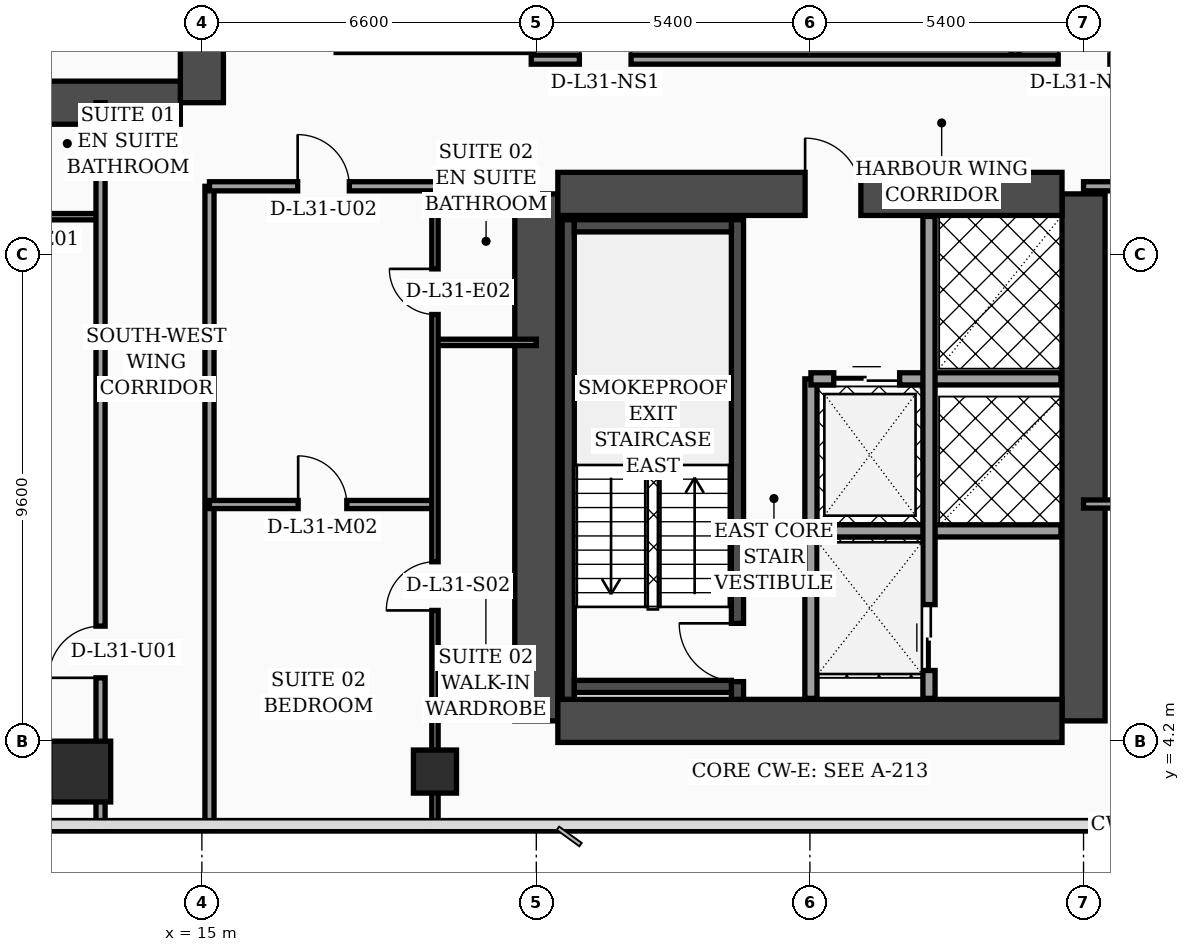
"""IFC4 building model, lengths in metres.
Left out: names, types, materials, properties, quantities, classifications, styles, units other than length and angle.
Written with IfcOpenShell. Run it as: python <this file> out.ifc"""

import sys

from ifc_helpers import new_model, si_unit, direction, frame, frame_2d, origin, origin_2d, place, context, subcontext, project, spatial, rectangle, hollow_rectangle, extrude, element, fill, save


model = new_model("IFC4")
c1 = context("Model", 3, precision=1e-05, world=origin(), true_north=direction((0.0, 1.0)))
c2 = subcontext(c1, "Body", "Model", "MODEL_VIEW")
j1 = project(units=[si_unit("LENGTHUNIT", "METRE"), si_unit("PLANEANGLEUNIT", "RADIAN")], contexts=[c1])
p1 = place(None, origin())
s1 = spatial("IfcSite", under=j1, at=p1, CompositionType="ELEMENT")
p2 = place(p1, origin())
s2 = spatial("IfcBuilding", under=s1, at=p2, CompositionType="ELEMENT")
p3 = place(p2, frame((0.0, 0.0, 127.8)))
s3 = spatial("IfcBuildingStorey", under=s2, at=p3, CompositionType="ELEMENT", Elevation=127.8)
p4 = place(p3, frame((15.0, 16.8, 0.0), z_axis=(0.0, 0.0, 1.0), x_axis=(0.0, 1.0, 0.0)))
e1 = element("IfcWall", 1, at=p4, inside=s3, PredefinedType="SHEAR", context=c2, shape_type="SweptSolid", body=[
    extrude(rectangle(XDim=21.6, YDim=0.85, at=frame_2d((10.8, 0.0))), origin(), (0.0, 0.0, 1.0), 3.56),
])
p5 = place(p4, frame((8.65, 0.0, 0.0)))
e2 = element("IfcOpeningElement", 2, at=p5, cuts=e1, PredefinedType="OPENING", context=c2, shape_type="SweptSolid", body=[
    extrude(rectangle(XDim=1.1, YDim=2.2, at=frame_2d((0.55, 1.1))), frame((0.0, 0.435, 0.0), z_axis=(0.0, -1.0, 0.0), x_axis=(1.0, 0.0, 0.0)), (0.0, 0.0, 1.0), 0.87),
])
p6 = place(p4, frame((10.85, 0.0, 0.0)))
e3 = element("IfcOpeningElement", 3, at=p6, cuts=e1, PredefinedType="OPENING", context=c2, shape_type="SweptSolid", body=[
    extrude(rectangle(XDim=1.1, YDim=2.2, at=frame_2d((0.55, 1.1))), frame((0.0, 0.435, 0.0), z_axis=(0.0, -1.0, 0.0), x_axis=(1.0, 0.0, 0.0)), (0.0, 0.0, 1.0), 0.87),
])
p7 = place(p4, frame((13.5, 0.0, 0.0)))
e4 = element("IfcOpeningElement", 4, at=p7, cuts=e1, PredefinedType="OPENING", context=c2, shape_type="SweptSolid", body=[
    extrude(rectangle(XDim=1.1, YDim=2.2, at=frame_2d((0.55, 1.1))), frame((0.0, 0.435, 0.0), z_axis=(0.0, -1.0, 0.0), x_axis=(1.0, 0.0, 0.0)), (0.0, 0.0, 1.0), 0.87),
])
p8 = place(p4, frame((16.15, 0.0, 0.0)))
e5 = element("IfcOpeningElement", 5, at=p8, cuts=e1, PredefinedType="OPENING", context=c2, shape_type="SweptSolid", body=[
    extrude(rectangle(XDim=1.1, YDim=2.2, at=frame_2d((0.55, 1.1))), frame((0.0, 0.435, 0.0), z_axis=(0.0, -1.0, 0.0), x_axis=(1.0, 0.0, 0.0)), (0.0, 0.0, 1.0), 0.87),
])
p9 = place(p3, frame((4.625, 16.8, 0.0), z_axis=(0.0, 0.0, 1.0), x_axis=(1.0, 0.0, 0.0)))
e6 = element("IfcWall", 6, at=p9, inside=s3, PredefinedType="SHEAR", context=c2, shape_type="SweptSolid", body=[
    extrude(rectangle(XDim=9.95, YDim=0.85, at=frame_2d((4.975, 0.0))), origin(), (0.0, 0.0, 1.0), 3.56),
])
for number, where, z_axis, x_axis in (
    (7, (21.6, 4.6, 0.0), (0.0, 0.0, 1.0), (0.0, 1.0, 0.0)),
    (8, (32.4, 4.6, 0.0), (0.0, 0.0, 1.0), (0.0, 1.0, 0.0)),
):
    element("IfcWall", number, at=place(p3, frame(where, z_axis=z_axis, x_axis=x_axis)), inside=s3, PredefinedType="SHEAR", context=c2, shape_type="SweptSolid", body=[
        extrude(rectangle(XDim=10.4, YDim=0.85, at=frame_2d((5.2, 0.0))), origin(), (0.0, 0.0, 1.0), 3.56),
    ])
p10 = place(p3, frame((22.025, 15.0, 0.0), z_axis=(0.0, 0.0, 1.0), x_axis=(1.0, 0.0, 0.0)))
e9 = element("IfcWall", 9, at=p10, inside=s3, PredefinedType="SHEAR", context=c2, shape_type="SweptSolid", body=[
    extrude(rectangle(XDim=9.95, YDim=0.85, at=frame_2d((4.975, 0.0))), origin(), (0.0, 0.0, 1.0), 3.56),
])
p11 = place(p10, frame((4.88, 0.0, 0.0)))
e10 = element("IfcOpeningElement", 10, at=p11, cuts=e9, PredefinedType="OPENING", context=c2, shape_type="SweptSolid", body=[
    extrude(rectangle(XDim=1.1, YDim=2.2, at=frame_2d((0.55, 1.1))), frame((0.0, 0.435, 0.0), z_axis=(0.0, -1.0, 0.0), x_axis=(1.0, 0.0, 0.0)), (0.0, 0.0, 1.0), 0.87),
])
p12 = place(p3, frame((22.025, 4.6, 0.0), z_axis=(0.0, 0.0, 1.0), x_axis=(1.0, 0.0, 0.0)))
e11 = element("IfcWall", 11, at=p12, inside=s3, PredefinedType="SHEAR", context=c2, shape_type="SweptSolid", body=[
    extrude(rectangle(XDim=9.95, YDim=0.85, at=frame_2d((4.975, 0.0))), origin(), (0.0, 0.0, 1.0), 3.56),
])
p13 = place(p3, frame((22.23, 5.025, 0.0), z_axis=(0.0, 0.0, 1.0), x_axis=(0.0, 1.0, 0.0)))
e12 = element("IfcWall", 12, at=p13, inside=s3, PredefinedType="SOLIDWALL", context=c2, shape_type="SweptSolid", body=[
    extrude(rectangle(XDim=9.465, YDim=0.24, at=frame_2d((4.732, 0.0))), origin(), (0.0, 0.0, 1.0), 3.56),
])
p14 = place(p3, frame((25.57, 5.025, 0.0), z_axis=(0.0, 0.0, 1.0), x_axis=(0.0, 1.0, 0.0)))
e13 = element("IfcWall", 13, at=p14, inside=s3, PredefinedType="SOLIDWALL", context=c2, shape_type="SweptSolid", body=[
    extrude(rectangle(XDim=9.465, YDim=0.24, at=frame_2d((4.732, 0.0))), origin(), (0.0, 0.0, 1.0), 3.56),
])
p15 = place(p14, frame((0.35, 0.0, 0.0)))
e14 = element("IfcOpeningElement", 14, at=p15, cuts=e13, PredefinedType="OPENING", context=c2, shape_type="SweptSolid", body=[
    extrude(rectangle(XDim=1.15, YDim=2.2, at=frame_2d((0.575, 1.1))), frame((0.0, 0.13, 0.0), z_axis=(0.0, -1.0, 0.0), x_axis=(1.0, 0.0, 0.0)), (0.0, 0.0, 1.0), 0.26),
])
for number, where, z_axis, x_axis in (
    (15, (22.35, 5.28, 0.0), (0.0, 0.0, 1.0), (1.0, 0.0, 0.0)),
    (16, (22.35, 14.37, 0.0), (0.0, 0.0, 1.0), (1.0, 0.0, 0.0)),
):
    element("IfcWall", number, at=place(p3, frame(where, z_axis=z_axis, x_axis=x_axis)), inside=s3, PredefinedType="SOLIDWALL", context=c2, shape_type="SweptSolid", body=[
        extrude(rectangle(XDim=3.1, YDim=0.24, at=frame_2d((1.55, 0.0))), origin(), (0.0, 0.0, 1.0), 3.56),
    ])
p16 = place(p3, frame((12.6, 3.6, 0.0), z_axis=(0.0, 0.0, 1.0), x_axis=(1.0, 0.0, 0.0)))
e17 = element("IfcColumn", 17, at=p16, inside=s3, PredefinedType="COLUMN", context=c2, shape_type="SweptSolid", body=[
    extrude(rectangle(XDim=1.2, YDim=1.2, at=origin_2d()), origin(), (0.0, 0.0, 1.0), 3.56),
])
p17 = place(p3, frame((19.6, 3.6, 0.0), z_axis=(0.0, 0.0, 1.0), x_axis=(1.0, 0.0, 0.0)))
e18 = element("IfcColumn", 18, at=p17, inside=s3, PredefinedType="COLUMN", context=c2, shape_type="SweptSolid", body=[
    extrude(hollow_rectangle(XDim=0.85, YDim=0.85, WallThickness=0.036, at=origin_2d()), origin(), (0.0, 0.0, 1.0), 3.56),
])
p18 = place(p3, frame((27.02, 5.045, 0.0), z_axis=(0.0, 0.0, 1.0), x_axis=(0.0, 1.0, 0.0)))
e19 = element("IfcWall", 19, at=p18, inside=s3, PredefinedType="SOLIDWALL", context=c2, shape_type="SweptSolid", body=[
    extrude(rectangle(XDim=6.305, YDim=0.24, at=frame_2d((3.153, 0.0))), origin(), (0.0, 0.0, 1.0), 3.56),
])
p19 = place(p3, frame((27.02, 11.35, 0.0), z_axis=(0.0, 0.0, 1.0), x_axis=(1.0, 0.0, 0.0)))
e20 = element("IfcWall", 20, at=p19, inside=s3, PredefinedType="SOLIDWALL", context=c2, shape_type="SweptSolid", body=[
    extrude(rectangle(XDim=4.935, YDim=0.24, at=frame_2d((2.468, 0.0))), origin(), (0.0, 0.0, 1.0), 3.56),
])
p20 = place(p19, frame((0.45, 0.0, 0.0)))
e21 = element("IfcOpeningElement", 21, at=p20, cuts=e20, PredefinedType="OPENING", context=c2, shape_type="SweptSolid", body=[
    extrude(rectangle(XDim=1.3, YDim=2.35, at=frame_2d((0.65, 1.175))), frame((0.0, 0.13, 0.0), z_axis=(0.0, -1.0, 0.0), x_axis=(1.0, 0.0, 0.0)), (0.0, 0.0, 1.0), 0.26),
])
p21 = place(p3, frame((27.02, 8.35, 0.0), z_axis=(0.0, 0.0, 1.0), x_axis=(1.0, 0.0, 0.0)))
e22 = element("IfcWall", 22, at=p21, inside=s3, PredefinedType="SOLIDWALL", context=c2, shape_type="SweptSolid", body=[
    extrude(rectangle(XDim=4.935, YDim=0.24, at=frame_2d((2.468, 0.0))), origin(), (0.0, 0.0, 1.0), 3.56),
])
p22 = place(p3, frame((29.35, 5.045, 0.0), z_axis=(0.0, 0.0, 1.0), x_axis=(0.0, 1.0, 0.0)))
e23 = element("IfcWall", 23, at=p22, inside=s3, PredefinedType="SOLIDWALL", context=c2, shape_type="SweptSolid", body=[
    extrude(rectangle(XDim=9.51, YDim=0.24, at=frame_2d((4.755, 0.0))), origin(), (0.0, 0.0, 1.0), 3.56),
])
p23 = place(p22, frame((0.55, 0.0, 0.0)))
e24 = element("IfcOpeningElement", 24, at=p23, cuts=e23, PredefinedType="OPENING", context=c2, shape_type="SweptSolid", body=[
    extrude(rectangle(XDim=1.3, YDim=2.35, at=frame_2d((0.65, 1.175))), frame((0.0, 0.13, 0.0), z_axis=(0.0, -1.0, 0.0), x_axis=(1.0, 0.0, 0.0)), (0.0, 0.0, 1.0), 0.26),
])
p24 = place(p3, frame((3.2, 14.55, 0.0), z_axis=(0.0, 0.0, 1.0), x_axis=(1.0, 0.0, 0.0)))
e25 = element("IfcWall", 25, at=p24, inside=s3, PredefinedType="PARTITIONING", context=c2, shape_type="SweptSolid", body=[
    extrude(rectangle(XDim=9.8, YDim=0.125, at=frame_2d((4.9, 0.0))), origin(), (0.0, 0.0, 1.0), 2.84),
])
p25 = place(p24, frame((3.32, 0.0, 0.0)))
e26 = element("IfcOpeningElement", 26, at=p25, cuts=e25, PredefinedType="OPENING", context=c2, shape_type="SweptSolid", body=[
    extrude(rectangle(XDim=0.96, YDim=2.2, at=frame_2d((0.48, 1.1))), frame((0.0, 0.073, 0.0), z_axis=(0.0, -1.0, 0.0), x_axis=(1.0, 0.0, 0.0)), (0.0, 0.0, 1.0), 0.145),
])
p26 = place(p24, frame((7.89, 0.0, 0.0)))
e27 = element("IfcOpeningElement", 27, at=p26, cuts=e25, PredefinedType="OPENING", context=c2, shape_type="SweptSolid", body=[
    extrude(rectangle(XDim=0.9, YDim=2.15, at=frame_2d((0.45, 1.075))), frame((0.0, 0.073, 0.0), z_axis=(0.0, -1.0, 0.0), x_axis=(1.0, 0.0, 0.0)), (0.0, 0.0, 1.0), 0.145),
])
p27 = place(p3, frame((13.0, 2.44, 0.0), z_axis=(0.0, 0.0, 1.0), x_axis=(0.0, 1.0, 0.0)))
e28 = element("IfcWall", 28, at=p27, inside=s3, PredefinedType="PARTITIONING", context=c2, shape_type="SweptSolid", body=[
    extrude(rectangle(XDim=14.36, YDim=0.18, at=frame_2d((7.18, 0.0))), origin(), (0.0, 0.0, 1.0), 2.84),
])
p28 = place(p27, frame((3.01, 0.0, 0.0)))
e29 = element("IfcOpeningElement", 29, at=p28, cuts=e28, PredefinedType="OPENING", context=c2, shape_type="SweptSolid", body=[
    extrude(rectangle(XDim=1.02, YDim=2.2, at=frame_2d((0.51, 1.1))), frame((0.0, 0.1, 0.0), z_axis=(0.0, -1.0, 0.0), x_axis=(1.0, 0.0, 0.0)), (0.0, 0.0, 1.0), 0.2),
])
p29 = place(p3, frame((15.15, 2.44, 0.0), z_axis=(0.0, 0.0, 1.0), x_axis=(0.0, 1.0, 0.0)))
e30 = element("IfcWall", 30, at=p29, inside=s3, PredefinedType="PARTITIONING", context=c2, shape_type="SweptSolid", body=[
    extrude(rectangle(XDim=12.71, YDim=0.18, at=frame_2d((6.355, 0.0))), origin(), (0.0, 0.0, 1.0), 3.04),
])
p30 = place(p3, frame((19.6, 12.07, 0.0), z_axis=(0.0, 0.0, 1.0), x_axis=(1.0, 0.0, 0.0)))
e31 = element("IfcWall", 31, at=p30, inside=s3, PredefinedType="PARTITIONING", context=c2, shape_type="SweptSolid", body=[
    extrude(rectangle(XDim=2.0, YDim=0.125, at=frame_2d((1.0, 0.0))), origin(), (0.0, 0.0, 1.0), 3.56),
])
p31 = place(p3, frame((15.15, 8.87, 0.0), z_axis=(0.0, 0.0, 1.0), x_axis=(1.0, 0.0, 0.0)))
e32 = element("IfcWall", 32, at=p31, inside=s3, PredefinedType="PARTITIONING", context=c2, shape_type="SweptSolid", body=[
    extrude(rectangle(XDim=4.45, YDim=0.16, at=frame_2d((2.225, 0.0))), origin(), (0.0, 0.0, 1.0), 3.56),
])
p32 = place(p31, frame((1.75, 0.0, 0.0)))
e33 = element("IfcOpeningElement", 33, at=p32, cuts=e32, PredefinedType="OPENING", context=c2, shape_type="SweptSolid", body=[
    extrude(rectangle(XDim=0.96, YDim=2.2, at=frame_2d((0.48, 1.1))), frame((0.0, 0.09, 0.0), z_axis=(0.0, -1.0, 0.0), x_axis=(1.0, 0.0, 0.0)), (0.0, 0.0, 1.0), 0.18),
])
p33 = place(p3, frame((19.6, 2.44, 0.0), z_axis=(0.0, 0.0, 1.0), x_axis=(0.0, 1.0, 0.0)))
e34 = element("IfcWall", 34, at=p33, inside=s3, PredefinedType="PARTITIONING", context=c2, shape_type="SweptSolid", body=[
    extrude(rectangle(XDim=12.71, YDim=0.125, at=frame_2d((6.355, 0.0))), origin(), (0.0, 0.0, 1.0), 2.49),
])
p34 = place(p33, frame((4.34, 0.0, 0.0)))
e35 = element("IfcOpeningElement", 35, at=p34, cuts=e34, PredefinedType="OPENING", context=c2, shape_type="SweptSolid", body=[
    extrude(rectangle(XDim=0.96, YDim=2.2, at=frame_2d((0.48, 1.1))), frame((0.0, 0.073, 0.0), z_axis=(0.0, -1.0, 0.0), x_axis=(1.0, 0.0, 0.0)), (0.0, 0.0, 1.0), 0.145),
])
p35 = place(p33, frame((10.18, 0.0, 0.0)))
e36 = element("IfcOpeningElement", 36, at=p35, cuts=e34, PredefinedType="OPENING", context=c2, shape_type="SweptSolid", body=[
    extrude(rectangle(XDim=0.9, YDim=2.15, at=frame_2d((0.45, 1.075))), frame((0.0, 0.073, 0.0), z_axis=(0.0, -1.0, 0.0), x_axis=(1.0, 0.0, 0.0)), (0.0, 0.0, 1.0), 0.145),
])
p36 = place(p3, frame((15.15, 15.15, 0.0), z_axis=(0.0, 0.0, 1.0), x_axis=(1.0, 0.0, 0.0)))
e37 = element("IfcWall", 37, at=p36, inside=s3, PredefinedType="PARTITIONING", context=c2, shape_type="SweptSolid", body=[
    extrude(rectangle(XDim=6.45, YDim=0.18, at=frame_2d((3.225, 0.0))), origin(), (0.0, 0.0, 1.0), 2.49),
])
p37 = place(p36, frame((1.74, 0.0, 0.0)))
e38 = element("IfcOpeningElement", 38, at=p37, cuts=e37, PredefinedType="OPENING", context=c2, shape_type="SweptSolid", body=[
    extrude(rectangle(XDim=1.02, YDim=2.2, at=frame_2d((0.51, 1.1))), frame((0.0, 0.1, 0.0), z_axis=(0.0, -1.0, 0.0), x_axis=(1.0, 0.0, 0.0)), (0.0, 0.0, 1.0), 0.2),
])
p38 = place(p3, frame((17.65, 17.88, 0.0), z_axis=(0.0, 0.0, 1.0), x_axis=(1.0, 0.0, 0.0)))
e39 = element("IfcWall", 39, at=p38, inside=s3, PredefinedType="PARTITIONING", context=c2, shape_type="SweptSolid", body=[
    extrude(rectangle(XDim=3.9, YDim=0.18, at=frame_2d((1.95, 0.0))), origin(), (0.0, 0.0, 1.0), 3.09),
])
p39 = place(p3, frame((32.4, 8.88, 0.0), z_axis=(0.0, 0.0, 1.0), x_axis=(1.0, 0.0, 0.0)))
e40 = element("IfcWall", 40, at=p39, inside=s3, PredefinedType="PARTITIONING", context=c2, shape_type="SweptSolid", body=[
    extrude(rectangle(XDim=7.02, YDim=0.16, at=frame_2d((3.51, 0.0))), origin(), (0.0, 0.0, 1.0), 2.84),
])
p40 = place(p39, frame((3.03, 0.0, 0.0)))
e41 = element("IfcOpeningElement", 41, at=p40, cuts=e40, PredefinedType="OPENING", context=c2, shape_type="SweptSolid", body=[
    extrude(rectangle(XDim=0.96, YDim=2.2, at=frame_2d((0.48, 1.1))), frame((0.0, 0.09, 0.0), z_axis=(0.0, -1.0, 0.0), x_axis=(1.0, 0.0, 0.0)), (0.0, 0.0, 1.0), 0.18),
])
p41 = place(p3, frame((32.4, 15.15, 0.0), z_axis=(0.0, 0.0, 1.0), x_axis=(1.0, 0.0, 0.0)))
e42 = element("IfcWall", 42, at=p41, inside=s3, PredefinedType="PARTITIONING", context=c2, shape_type="SweptSolid", body=[
    extrude(rectangle(XDim=9.15, YDim=0.18, at=frame_2d((4.575, 0.0))), origin(), (0.0, 0.0, 1.0), 2.84),
])
p42 = place(p41, frame((3.1, 0.0, 0.0)))
e43 = element("IfcOpeningElement", 43, at=p42, cuts=e42, PredefinedType="OPENING", context=c2, shape_type="SweptSolid", body=[
    extrude(rectangle(XDim=1.02, YDim=2.2, at=frame_2d((0.51, 1.1))), frame((0.0, 0.1, 0.0), z_axis=(0.0, -1.0, 0.0), x_axis=(1.0, 0.0, 0.0)), (0.0, 0.0, 1.0), 0.2),
])
p43 = place(p3, frame((31.05, 17.65, 0.0), z_axis=(0.0, 0.0, 1.0), x_axis=(0.0, 1.0, 0.0)))
e44 = element("IfcWall", 44, at=p43, inside=s3, PredefinedType="PARTITIONING", context=c2, shape_type="SweptSolid", body=[
    extrude(rectangle(XDim=12.1, YDim=0.16, at=frame_2d((6.05, 0.0))), origin(), (0.0, 0.0, 1.0), 2.84),
])
p44 = place(p3, frame((21.5, 17.65, 0.0), z_axis=(0.0, 0.0, 1.0), x_axis=(1.0, 0.0, 0.0)))
e45 = element("IfcWall", 45, at=p44, inside=s3, PredefinedType="PARTITIONING", context=c2, shape_type="SweptSolid", body=[
    extrude(rectangle(XDim=17.7, YDim=0.18, at=frame_2d((8.85, 0.0))), origin(), (0.0, 0.0, 1.0), 2.84),
])
p45 = place(p44, frame((0.95, 0.0, 0.0)))
e46 = element("IfcOpeningElement", 46, at=p45, cuts=e45, PredefinedType="OPENING", context=c2, shape_type="SweptSolid", body=[
    extrude(rectangle(XDim=1.02, YDim=2.2, at=frame_2d((0.51, 1.1))), frame((0.0, 0.1, 0.0), z_axis=(0.0, -1.0, 0.0), x_axis=(1.0, 0.0, 0.0)), (0.0, 0.0, 1.0), 0.2),
])
p46 = place(p44, frame((10.4, 0.0, 0.0)))
e47 = element("IfcOpeningElement", 47, at=p46, cuts=e45, PredefinedType="OPENING", context=c2, shape_type="SweptSolid", body=[
    extrude(rectangle(XDim=1.02, YDim=2.2, at=frame_2d((0.51, 1.1))), frame((0.0, 0.1, 0.0), z_axis=(0.0, -1.0, 0.0), x_axis=(1.0, 0.0, 0.0)), (0.0, 0.0, 1.0), 0.2),
])
p47 = place(p20, origin())
e48 = element("IfcDoor", 48, at=p47, inside=s3, OperationType="DOUBLE_DOOR_SLIDING", PredefinedType="DOOR", context=c2, shape_type="SweptSolid", body=[
    extrude(rectangle(XDim=1.3, YDim=2.35, at=frame_2d((0.65, 1.175))), frame((0.0, 0.025, 0.0), z_axis=(0.0, -1.0, 0.0), x_axis=(1.0, 0.0, 0.0)), (0.0, 0.0, 1.0), 0.05),
])
fill(e21, e48)
p48 = place(p23, origin())
e49 = element("IfcDoor", 49, at=p48, inside=s3, OperationType="DOUBLE_DOOR_SLIDING", PredefinedType="DOOR", context=c2, shape_type="SweptSolid", body=[
    extrude(rectangle(XDim=1.3, YDim=2.35, at=frame_2d((0.65, 1.175))), frame((0.0, 0.025, 0.0), z_axis=(0.0, -1.0, 0.0), x_axis=(1.0, 0.0, 0.0)), (0.0, 0.0, 1.0), 0.05),
])
fill(e24, e49)
p49 = place(p28, origin())
e50 = element("IfcDoor", 50, at=p49, inside=s3, OperationType="SINGLE_SWING_LEFT", PredefinedType="DOOR", context=c2, shape_type="SweptSolid", body=[
    extrude(rectangle(XDim=1.02, YDim=2.2, at=frame_2d((0.51, 1.1))), frame((0.0, 0.025, 0.0), z_axis=(0.0, -1.0, 0.0), x_axis=(1.0, 0.0, 0.0)), (0.0, 0.0, 1.0), 0.05),
])
fill(e29, e50)
p50 = place(p32, origin())
e51 = element("IfcDoor", 51, at=p50, inside=s3, OperationType="SINGLE_SWING_LEFT", PredefinedType="DOOR", context=c2, shape_type="SweptSolid", body=[
    extrude(rectangle(XDim=0.96, YDim=2.2, at=frame_2d((0.48, 1.1))), frame((0.0, 0.025, 0.0), z_axis=(0.0, -1.0, 0.0), x_axis=(1.0, 0.0, 0.0)), (0.0, 0.0, 1.0), 0.05),
])
fill(e33, e51)
p51 = place(p34, origin())
e52 = element("IfcDoor", 52, at=p51, inside=s3, OperationType="SINGLE_SWING_LEFT", PredefinedType="DOOR", context=c2, shape_type="SweptSolid", body=[
    extrude(rectangle(XDim=0.96, YDim=2.2, at=frame_2d((0.48, 1.1))), frame((0.0, 0.025, 0.0), z_axis=(0.0, -1.0, 0.0), x_axis=(1.0, 0.0, 0.0)), (0.0, 0.0, 1.0), 0.05),
])
fill(e35, e52)
p52 = place(p35, origin())
e53 = element("IfcDoor", 53, at=p52, inside=s3, OperationType="SINGLE_SWING_RIGHT", PredefinedType="DOOR", context=c2, shape_type="SweptSolid", body=[
    extrude(rectangle(XDim=0.9, YDim=2.15, at=frame_2d((0.45, 1.075))), frame((0.0, 0.025, 0.0), z_axis=(0.0, -1.0, 0.0), x_axis=(1.0, 0.0, 0.0)), (0.0, 0.0, 1.0), 0.05),
])
fill(e36, e53)
p53 = place(p37, origin())
e54 = element("IfcDoor", 54, at=p53, inside=s3, OperationType="SINGLE_SWING_LEFT", PredefinedType="DOOR", context=c2, shape_type="SweptSolid", body=[
    extrude(rectangle(XDim=1.02, YDim=2.2, at=frame_2d((0.51, 1.1))), frame((0.0, 0.025, 0.0), z_axis=(0.0, -1.0, 0.0), x_axis=(1.0, 0.0, 0.0)), (0.0, 0.0, 1.0), 0.05),
])
fill(e38, e54)
p54 = place(p45, origin())
e55 = element("IfcDoor", 55, at=p54, inside=s3, OperationType="SINGLE_SWING_RIGHT", PredefinedType="DOOR", context=c2, shape_type="SweptSolid", body=[
    extrude(rectangle(XDim=1.02, YDim=2.2, at=frame_2d((0.51, 1.1))), frame((0.0, 0.025, 0.0), z_axis=(0.0, -1.0, 0.0), x_axis=(1.0, 0.0, 0.0)), (0.0, 0.0, 1.0), 0.05),
])
fill(e46, e55)
p55 = place(p46, origin())
e56 = element("IfcDoor", 56, at=p55, inside=s3, OperationType="SINGLE_SWING_LEFT", PredefinedType="DOOR", context=c2, shape_type="SweptSolid", body=[
    extrude(rectangle(XDim=1.02, YDim=2.2, at=frame_2d((0.51, 1.1))), frame((0.0, 0.025, 0.0), z_axis=(0.0, -1.0, 0.0), x_axis=(1.0, 0.0, 0.0)), (0.0, 0.0, 1.0), 0.05),
])
fill(e47, e56)
p56 = place(p15, origin())
e57 = element("IfcDoor", 57, at=p56, inside=s3, OperationType="SINGLE_SWING_RIGHT", PredefinedType="DOOR", context=c2, shape_type="SweptSolid", body=[
    extrude(rectangle(XDim=1.15, YDim=2.2, at=frame_2d((0.575, 1.1))), frame((0.0, 0.025, 0.0), z_axis=(0.0, -1.0, 0.0), x_axis=(1.0, 0.0, 0.0)), (0.0, 0.0, 1.0), 0.05),
])
fill(e14, e57)
p57 = place(p11, origin())
e58 = element("IfcDoor", 58, at=p57, inside=s3, OperationType="SINGLE_SWING_LEFT", PredefinedType="DOOR", context=c2, shape_type="SweptSolid", body=[
    extrude(rectangle(XDim=1.1, YDim=2.2, at=frame_2d((0.55, 1.1))), frame((0.0, 0.025, 0.0), z_axis=(0.0, -1.0, 0.0), x_axis=(1.0, 0.0, 0.0)), (0.0, 0.0, 1.0), 0.05),
])
fill(e10, e58)
save(model, sys.argv[1])
